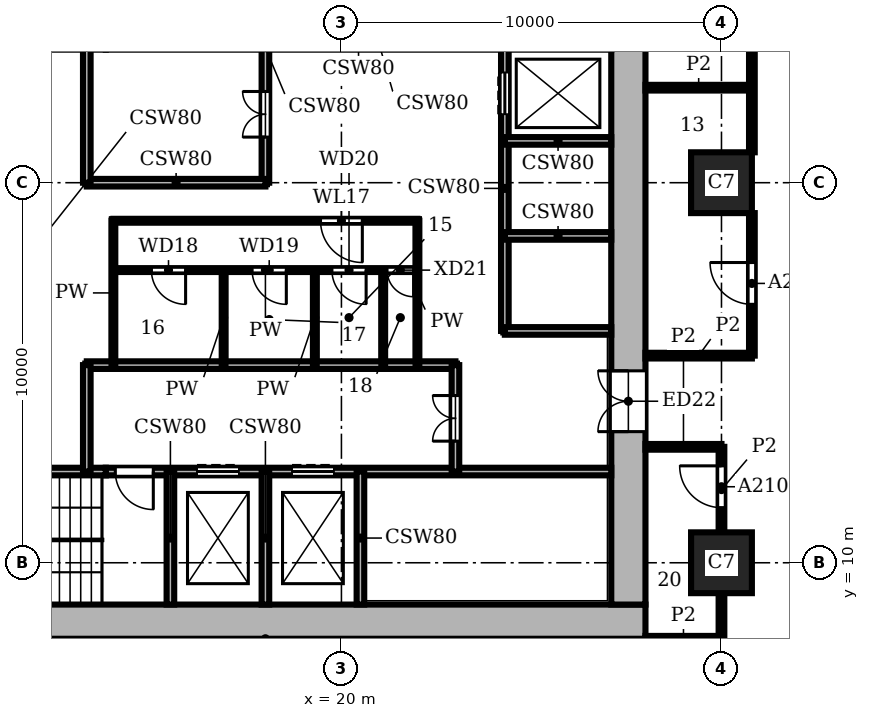
"""IFC4 building model, lengths in metres.
Left out: names, types, materials, properties, quantities, classifications, styles, units other than length and angle.
Written with IfcOpenShell. Run it as: python <this file> out.ifc"""

import sys

from ifc_helpers import new_model, si_unit, direction, frame, frame_2d, origin, origin_2d, place, context, subcontext, project, spatial, rectangle, extrude, element, fill, save


model = new_model("IFC4")
c1 = context("Model", 3, precision=1e-05, world=origin(), true_north=direction((0.0, 1.0)))
c2 = subcontext(c1, "Body", "Model", "MODEL_VIEW")
j1 = project(units=[si_unit("LENGTHUNIT", "METRE"), si_unit("PLANEANGLEUNIT", "RADIAN")], contexts=[c1])
p1 = place(None, origin())
s1 = spatial("IfcSite", under=j1, at=p1, CompositionType="ELEMENT")
p2 = place(p1, origin())
s2 = spatial("IfcBuilding", under=s1, at=p2, CompositionType="ELEMENT")
p3 = place(p2, frame((0.0, 0.0, 23.7)))
s3 = spatial("IfcBuildingStorey", under=s2, at=p3, CompositionType="ELEMENT", Elevation=23.7)
for number, where, z_axis, x_axis in (
    (1, (30.0, 10.0, 0.0), (0.0, 0.0, 1.0), (1.0, 0.0, 0.0)),
    (2, (30.0, 20.0, 0.0), (0.0, 0.0, 1.0), (1.0, 0.0, 0.0)),
):
    element("IfcColumn", number, at=place(p3, frame(where, z_axis=z_axis, x_axis=x_axis)), inside=s3, PredefinedType="COLUMN", context=c2, shape_type="SweptSolid", body=[
        extrude(rectangle(XDim=1.6, YDim=1.6, at=origin_2d()), origin(), (0.0, 0.0, 1.0), 3.9),
    ])
p4 = place(p3, frame((8.0, 8.45, 0.0), z_axis=(0.0, 0.0, 1.0), x_axis=(1.0, 0.0, 0.0)))
e3 = element("IfcWall", 3, at=p4, inside=s3, PredefinedType="SHEAR", context=c2, shape_type="SweptSolid", body=[
    extrude(rectangle(XDim=20.0, YDim=0.9, at=frame_2d((10.0, 0.0))), origin(), (0.0, 0.0, 1.0), 3.9),
])
p5 = place(p3, frame((27.55, 8.9, 0.0), z_axis=(0.0, 0.0, 1.0), x_axis=(0.0, 1.0, 0.0)))
e4 = element("IfcWall", 4, at=p5, inside=s3, PredefinedType="SHEAR", context=c2, shape_type="SweptSolid", body=[
    extrude(rectangle(XDim=18.2, YDim=0.9, at=frame_2d((9.1, 0.0))), origin(), (0.0, 0.0, 1.0), 3.9),
])
p6 = place(p5, frame((4.55, 0.0, 0.0)))
e5 = element("IfcOpeningElement", 5, at=p6, cuts=e4, PredefinedType="OPENING", context=c2, shape_type="SweptSolid", body=[
    extrude(rectangle(XDim=1.6, YDim=2.1, at=frame_2d((0.8, 1.05))), frame((0.0, 0.46, 0.0), z_axis=(0.0, -1.0, 0.0), x_axis=(1.0, 0.0, 0.0)), (0.0, 0.0, 1.0), 0.92),
])
p7 = place(p3, frame((8.9, 12.4, 0.0), z_axis=(0.0, 0.0, 1.0), x_axis=(1.0, 0.0, 0.0)))
e6 = element("IfcWall", 6, at=p7, inside=s3, PredefinedType="SHEAR", context=c2, shape_type="SweptSolid", body=[
    extrude(rectangle(XDim=4.9, YDim=0.2, at=frame_2d((2.45, 0.0))), origin(), (0.0, 0.0, 1.0), 3.58),
])
p8 = place(p3, frame((13.8, 12.4, 0.0), z_axis=(0.0, 0.0, 1.0), x_axis=(1.0, 0.0, 0.0)))
e7 = element("IfcWall", 7, at=p8, inside=s3, PredefinedType="SHEAR", context=c2, shape_type="SweptSolid", body=[
    extrude(rectangle(XDim=13.3, YDim=0.2, at=frame_2d((6.65, 0.0))), origin(), (0.0, 0.0, 1.0), 3.58),
])
p9 = place(p8, frame((2.4, 0.0, 0.0)))
e8 = element("IfcOpeningElement", 8, at=p9, cuts=e7, PredefinedType="OPENING", context=c2, shape_type="SweptSolid", body=[
    extrude(rectangle(XDim=1.1, YDim=2.1, at=frame_2d((0.55, 1.05))), frame((0.0, 0.11, 0.0), z_axis=(0.0, -1.0, 0.0), x_axis=(1.0, 0.0, 0.0)), (0.0, 0.0, 1.0), 0.22),
])
p10 = place(p8, frame((4.9, 0.0, 0.0)))
e9 = element("IfcOpeningElement", 9, at=p10, cuts=e7, PredefinedType="OPENING", context=c2, shape_type="SweptSolid", body=[
    extrude(rectangle(XDim=1.1, YDim=2.1, at=frame_2d((0.55, 1.05))), frame((0.0, 0.11, 0.0), z_axis=(0.0, -1.0, 0.0), x_axis=(1.0, 0.0, 0.0)), (0.0, 0.0, 1.0), 0.22),
])
p11 = place(p8, frame((0.25, 0.0, 0.0)))
e10 = element("IfcOpeningElement", 10, at=p11, cuts=e7, PredefinedType="OPENING", context=c2, shape_type="SweptSolid", body=[
    extrude(rectangle(XDim=1.0, YDim=2.1, at=frame_2d((0.5, 1.05))), frame((0.0, 0.11, 0.0), z_axis=(0.0, -1.0, 0.0), x_axis=(1.0, 0.0, 0.0)), (0.0, 0.0, 1.0), 0.22),
])
p12 = place(p3, frame((13.3, 15.2, 0.0), z_axis=(0.0, 0.0, 1.0), x_axis=(1.0, 0.0, 0.0)))
e11 = element("IfcWall", 11, at=p12, inside=s3, PredefinedType="SHEAR", context=c2, shape_type="SweptSolid", body=[
    extrude(rectangle(XDim=9.7, YDim=0.2, at=frame_2d((4.85, 0.0))), origin(), (0.0, 0.0, 1.0), 3.58),
])
p13 = place(p3, frame((24.3, 16.1, 0.0), z_axis=(0.0, 0.0, 1.0), x_axis=(1.0, 0.0, 0.0)))
e12 = element("IfcWall", 12, at=p13, inside=s3, PredefinedType="SHEAR", context=c2, shape_type="SweptSolid", body=[
    extrude(rectangle(XDim=2.8, YDim=0.2, at=frame_2d((1.4, 0.0))), origin(), (0.0, 0.0, 1.0), 3.58),
])
p14 = place(p3, frame((14.0, 17.7, 0.0), z_axis=(0.0, 0.0, 1.0), x_axis=(1.0, 0.0, 0.0)))
e13 = element("IfcWall", 13, at=p14, inside=s3, PredefinedType="PARTITIONING", context=c2, shape_type="SweptSolid", body=[
    extrude(rectangle(XDim=8.0, YDim=0.1, at=frame_2d((4.0, 0.0))), origin(), (0.0, 0.0, 1.0), 3.58),
])
p15 = place(p14, frame((1.0, 0.0, 0.0)))
e14 = element("IfcOpeningElement", 14, at=p15, cuts=e13, PredefinedType="OPENING", context=c2, shape_type="SweptSolid", body=[
    extrude(rectangle(XDim=0.9, YDim=2.1, at=frame_2d((0.45, 1.05))), frame((0.0, 0.06, 0.0), z_axis=(0.0, -1.0, 0.0), x_axis=(1.0, 0.0, 0.0)), (0.0, 0.0, 1.0), 0.12),
])
p16 = place(p14, frame((3.65, 0.0, 0.0)))
e15 = element("IfcOpeningElement", 15, at=p16, cuts=e13, PredefinedType="OPENING", context=c2, shape_type="SweptSolid", body=[
    extrude(rectangle(XDim=0.9, YDim=2.1, at=frame_2d((0.45, 1.05))), frame((0.0, 0.06, 0.0), z_axis=(0.0, -1.0, 0.0), x_axis=(1.0, 0.0, 0.0)), (0.0, 0.0, 1.0), 0.12),
])
p17 = place(p14, frame((5.75, 0.0, 0.0)))
e16 = element("IfcOpeningElement", 16, at=p17, cuts=e13, PredefinedType="OPENING", context=c2, shape_type="SweptSolid", body=[
    extrude(rectangle(XDim=0.9, YDim=2.1, at=frame_2d((0.45, 1.05))), frame((0.0, 0.06, 0.0), z_axis=(0.0, -1.0, 0.0), x_axis=(1.0, 0.0, 0.0)), (0.0, 0.0, 1.0), 0.12),
])
p18 = place(p14, frame((7.2, 0.0, 0.0)))
e17 = element("IfcOpeningElement", 17, at=p18, cuts=e13, PredefinedType="OPENING", context=c2, shape_type="SweptSolid", body=[
    extrude(rectangle(XDim=0.7, YDim=2.1, at=frame_2d((0.35, 1.05))), frame((0.0, 0.06, 0.0), z_axis=(0.0, -1.0, 0.0), x_axis=(1.0, 0.0, 0.0)), (0.0, 0.0, 1.0), 0.12),
])
p19 = place(p3, frame((24.3, 18.6, 0.0), z_axis=(0.0, 0.0, 1.0), x_axis=(1.0, 0.0, 0.0)))
e18 = element("IfcWall", 18, at=p19, inside=s3, PredefinedType="SHEAR", context=c2, shape_type="SweptSolid", body=[
    extrude(rectangle(XDim=2.8, YDim=0.2, at=frame_2d((1.4, 0.0))), origin(), (0.0, 0.0, 1.0), 3.58),
])
p20 = place(p3, frame((14.0, 19.0, 0.0), z_axis=(0.0, 0.0, 1.0), x_axis=(1.0, 0.0, 0.0)))
e19 = element("IfcWall", 19, at=p20, inside=s3, PredefinedType="PARTITIONING", context=c2, shape_type="SweptSolid", body=[
    extrude(rectangle(XDim=8.0, YDim=0.1, at=frame_2d((4.0, 0.0))), origin(), (0.0, 0.0, 1.0), 3.58),
])
p21 = place(p20, frame((5.45, 0.0, 0.0)))
e20 = element("IfcOpeningElement", 20, at=p21, cuts=e19, PredefinedType="OPENING", context=c2, shape_type="SweptSolid", body=[
    extrude(rectangle(XDim=1.1, YDim=2.1, at=frame_2d((0.55, 1.05))), frame((0.0, 0.06, 0.0), z_axis=(0.0, -1.0, 0.0), x_axis=(1.0, 0.0, 0.0)), (0.0, 0.0, 1.0), 0.12),
])
p22 = place(p3, frame((13.3, 20.0, 0.0), z_axis=(0.0, 0.0, 1.0), x_axis=(1.0, 0.0, 0.0)))
e21 = element("IfcWall", 21, at=p22, inside=s3, PredefinedType="SHEAR", context=c2, shape_type="SweptSolid", body=[
    extrude(rectangle(XDim=4.7, YDim=0.2, at=frame_2d((2.35, 0.0))), origin(), (0.0, 0.0, 1.0), 3.58),
])
for number, where, z_axis, x_axis in (
    (22, (24.3, 21.1, 0.0), (0.0, 0.0, 1.0), (1.0, 0.0, 0.0)),
    (23, (13.3, 12.4, 0.0), (0.0, 0.0, 1.0), (0.0, 1.0, 0.0)),
):
    element("IfcWall", number, at=place(p3, frame(where, z_axis=z_axis, x_axis=x_axis)), inside=s3, PredefinedType="SHEAR", context=c2, shape_type="SweptSolid", body=[
        extrude(rectangle(XDim=2.8, YDim=0.2, at=frame_2d((1.4, 0.0))), origin(), (0.0, 0.0, 1.0), 3.58),
    ])
p23 = place(p3, frame((13.3, 20.0, 0.0), z_axis=(0.0, 0.0, 1.0), x_axis=(0.0, 1.0, 0.0)))
e24 = element("IfcWall", 24, at=p23, inside=s3, PredefinedType="SHEAR", context=c2, shape_type="SweptSolid", body=[
    extrude(rectangle(XDim=3.6, YDim=0.2, at=frame_2d((1.8, 0.0))), origin(), (0.0, 0.0, 1.0), 3.58),
])
p24 = place(p3, frame((14.0, 15.2, 0.0), z_axis=(0.0, 0.0, 1.0), x_axis=(0.0, 1.0, 0.0)))
e25 = element("IfcWall", 25, at=p24, inside=s3, PredefinedType="PARTITIONING", context=c2, shape_type="SweptSolid", body=[
    extrude(rectangle(XDim=3.8, YDim=0.1, at=frame_2d((1.9, 0.0))), origin(), (0.0, 0.0, 1.0), 3.58),
])
p25 = place(p3, frame((15.5, 8.9, 0.0), z_axis=(0.0, 0.0, 1.0), x_axis=(0.0, 1.0, 0.0)))
e26 = element("IfcWall", 26, at=p25, inside=s3, PredefinedType="SHEAR", context=c2, shape_type="SweptSolid", body=[
    extrude(rectangle(XDim=3.5, YDim=0.2, at=frame_2d((1.75, 0.0))), origin(), (0.0, 0.0, 1.0), 3.58),
])
p26 = place(p3, frame((16.9, 15.2, 0.0), z_axis=(0.0, 0.0, 1.0), x_axis=(0.0, 1.0, 0.0)))
e27 = element("IfcWall", 27, at=p26, inside=s3, PredefinedType="PARTITIONING", context=c2, shape_type="SweptSolid", body=[
    extrude(rectangle(XDim=2.5, YDim=0.1, at=frame_2d((1.25, 0.0))), origin(), (0.0, 0.0, 1.0), 3.58),
])
p27 = place(p3, frame((18.0, 8.9, 0.0), z_axis=(0.0, 0.0, 1.0), x_axis=(0.0, 1.0, 0.0)))
e28 = element("IfcWall", 28, at=p27, inside=s3, PredefinedType="SHEAR", context=c2, shape_type="SweptSolid", body=[
    extrude(rectangle(XDim=3.5, YDim=0.2, at=frame_2d((1.75, 0.0))), origin(), (0.0, 0.0, 1.0), 3.58),
])
p28 = place(p3, frame((18.0, 20.0, 0.0), z_axis=(0.0, 0.0, 1.0), x_axis=(0.0, 1.0, 0.0)))
e29 = element("IfcWall", 29, at=p28, inside=s3, PredefinedType="SHEAR", context=c2, shape_type="SweptSolid", body=[
    extrude(rectangle(XDim=7.1, YDim=0.2, at=frame_2d((3.55, 0.0))), origin(), (0.0, 0.0, 1.0), 3.58),
])
p29 = place(p28, frame((1.2, 0.0, 0.0)))
e30 = element("IfcOpeningElement", 30, at=p29, cuts=e29, PredefinedType="OPENING", context=c2, shape_type="SweptSolid", body=[
    extrude(rectangle(XDim=1.2, YDim=2.1, at=frame_2d((0.6, 1.05))), frame((0.0, 0.11, 0.0), z_axis=(0.0, -1.0, 0.0), x_axis=(1.0, 0.0, 0.0)), (0.0, 0.0, 1.0), 0.22),
])
p30 = place(p3, frame((19.3, 15.2, 0.0), z_axis=(0.0, 0.0, 1.0), x_axis=(0.0, 1.0, 0.0)))
e31 = element("IfcWall", 31, at=p30, inside=s3, PredefinedType="PARTITIONING", context=c2, shape_type="SweptSolid", body=[
    extrude(rectangle(XDim=2.5, YDim=0.1, at=frame_2d((1.25, 0.0))), origin(), (0.0, 0.0, 1.0), 3.58),
])
p31 = place(p3, frame((20.5, 8.9, 0.0), z_axis=(0.0, 0.0, 1.0), x_axis=(0.0, 1.0, 0.0)))
e32 = element("IfcWall", 32, at=p31, inside=s3, PredefinedType="SHEAR", context=c2, shape_type="SweptSolid", body=[
    extrude(rectangle(XDim=3.5, YDim=0.2, at=frame_2d((1.75, 0.0))), origin(), (0.0, 0.0, 1.0), 3.58),
])
p32 = place(p3, frame((21.1, 15.2, 0.0), z_axis=(0.0, 0.0, 1.0), x_axis=(0.0, 1.0, 0.0)))
e33 = element("IfcWall", 33, at=p32, inside=s3, PredefinedType="PARTITIONING", context=c2, shape_type="SweptSolid", body=[
    extrude(rectangle(XDim=2.5, YDim=0.1, at=frame_2d((1.25, 0.0))), origin(), (0.0, 0.0, 1.0), 3.58),
])
p33 = place(p3, frame((22.0, 15.2, 0.0), z_axis=(0.0, 0.0, 1.0), x_axis=(0.0, 1.0, 0.0)))
e34 = element("IfcWall", 34, at=p33, inside=s3, PredefinedType="PARTITIONING", context=c2, shape_type="SweptSolid", body=[
    extrude(rectangle(XDim=3.8, YDim=0.1, at=frame_2d((1.9, 0.0))), origin(), (0.0, 0.0, 1.0), 3.58),
])
p34 = place(p3, frame((23.0, 12.4, 0.0), z_axis=(0.0, 0.0, 1.0), x_axis=(0.0, 1.0, 0.0)))
e35 = element("IfcWall", 35, at=p34, inside=s3, PredefinedType="SHEAR", context=c2, shape_type="SweptSolid", body=[
    extrude(rectangle(XDim=2.8, YDim=0.2, at=frame_2d((1.4, 0.0))), origin(), (0.0, 0.0, 1.0), 3.58),
])
p35 = place(p34, frame((0.8, 0.0, 0.0)))
e36 = element("IfcOpeningElement", 36, at=p35, cuts=e35, PredefinedType="OPENING", context=c2, shape_type="SweptSolid", body=[
    extrude(rectangle(XDim=1.2, YDim=2.1, at=frame_2d((0.6, 1.05))), frame((0.0, 0.11, 0.0), z_axis=(0.0, -1.0, 0.0), x_axis=(1.0, 0.0, 0.0)), (0.0, 0.0, 1.0), 0.22),
])
p36 = place(p3, frame((24.3, 16.1, 0.0), z_axis=(0.0, 0.0, 1.0), x_axis=(0.0, 1.0, 0.0)))
e37 = element("IfcWall", 37, at=p36, inside=s3, PredefinedType="SHEAR", context=c2, shape_type="SweptSolid", body=[
    extrude(rectangle(XDim=7.5, YDim=0.2, at=frame_2d((3.75, 0.0))), origin(), (0.0, 0.0, 1.0), 3.58),
])
p37 = place(p36, frame((5.7, 0.0, 0.0)))
e38 = element("IfcOpeningElement", 38, at=p37, cuts=e37, PredefinedType="OPENING", context=c2, shape_type="SweptSolid", body=[
    extrude(rectangle(XDim=1.1, YDim=2.1, at=frame_2d((0.55, 1.05))), frame((0.0, 0.11, 0.0), z_axis=(0.0, -1.0, 0.0), x_axis=(1.0, 0.0, 0.0)), (0.0, 0.0, 1.0), 0.22),
])
p38 = place(p3, frame((30.0, 8.0, 0.0), z_axis=(0.0, 0.0, 1.0), x_axis=(0.0, 1.0, 0.0)))
e39 = element("IfcWall", 39, at=p38, inside=s3, PredefinedType="PARTITIONING", context=c2, shape_type="SweptSolid", body=[
    extrude(rectangle(XDim=1.2, YDim=0.15, at=frame_2d((0.6, 0.0))), origin(), (0.0, 0.0, 1.0), 3.58),
])
p39 = place(p3, frame((30.0, 10.8, 0.0), z_axis=(0.0, 0.0, 1.0), x_axis=(0.0, 1.0, 0.0)))
e40 = element("IfcWall", 40, at=p39, inside=s3, PredefinedType="PARTITIONING", context=c2, shape_type="SweptSolid", body=[
    extrude(rectangle(XDim=2.25, YDim=0.15, at=frame_2d((1.125, 0.0))), origin(), (0.0, 0.0, 1.0), 3.58),
])
p40 = place(p39, frame((0.65, 0.0, 0.0)))
e41 = element("IfcOpeningElement", 41, at=p40, cuts=e40, PredefinedType="OPENING", context=c2, shape_type="SweptSolid", body=[
    extrude(rectangle(XDim=1.1, YDim=2.1, at=frame_2d((0.55, 1.05))), frame((0.0, 0.085, 0.0), z_axis=(0.0, -1.0, 0.0), x_axis=(1.0, 0.0, 0.0)), (0.0, 0.0, 1.0), 0.17),
])
p41 = place(p3, frame((30.8, 15.45, 0.0), z_axis=(0.0, 0.0, 1.0), x_axis=(0.0, 1.0, 0.0)))
e42 = element("IfcWall", 42, at=p41, inside=s3, PredefinedType="PARTITIONING", context=c2, shape_type="SweptSolid", body=[
    extrude(rectangle(XDim=3.75, YDim=0.15, at=frame_2d((1.875, 0.0))), origin(), (0.0, 0.0, 1.0), 3.58),
])
p42 = place(p41, frame((1.35, 0.0, 0.0)))
e43 = element("IfcOpeningElement", 43, at=p42, cuts=e42, PredefinedType="OPENING", context=c2, shape_type="SweptSolid", body=[
    extrude(rectangle(XDim=1.1, YDim=2.1, at=frame_2d((0.55, 1.05))), frame((0.0, 0.085, 0.0), z_axis=(0.0, -1.0, 0.0), x_axis=(1.0, 0.0, 0.0)), (0.0, 0.0, 1.0), 0.17),
])
p43 = place(p3, frame((30.8, 20.8, 0.0), z_axis=(0.0, 0.0, 1.0), x_axis=(0.0, 1.0, 0.0)))
e44 = element("IfcWall", 44, at=p43, inside=s3, PredefinedType="PARTITIONING", context=c2, shape_type="SweptSolid", body=[
    extrude(rectangle(XDim=8.4, YDim=0.15, at=frame_2d((4.2, 0.0))), origin(), (0.0, 0.0, 1.0), 3.58),
])
p44 = place(p43, frame((3.8, 0.0, 0.0)))
e45 = element("IfcOpeningElement", 45, at=p44, cuts=e44, PredefinedType="OPENING", context=c2, shape_type="SweptSolid", body=[
    extrude(rectangle(XDim=1.1, YDim=2.1, at=frame_2d((0.55, 1.05))), frame((0.0, 0.085, 0.0), z_axis=(0.0, -1.0, 0.0), x_axis=(1.0, 0.0, 0.0)), (0.0, 0.0, 1.0), 0.17),
])
for number, where, z_axis, x_axis in (
    (46, (28.0, 8.0, 0.0), (0.0, 0.0, 1.0), (1.0, 0.0, 0.0)),
    (47, (28.0, 13.05, 0.0), (0.0, 0.0, 1.0), (1.0, 0.0, 0.0)),
):
    element("IfcWall", number, at=place(p3, frame(where, z_axis=z_axis, x_axis=x_axis)), inside=s3, PredefinedType="PARTITIONING", context=c2, shape_type="SweptSolid", body=[
        extrude(rectangle(XDim=2.0, YDim=0.15, at=frame_2d((1.0, 0.0))), origin(), (0.0, 0.0, 1.0), 3.58),
    ])
for number, where, z_axis, x_axis in (
    (48, (28.0, 15.45, 0.0), (0.0, 0.0, 1.0), (1.0, 0.0, 0.0)),
    (49, (28.0, 22.5, 0.0), (0.0, 0.0, 1.0), (1.0, 0.0, 0.0)),
):
    element("IfcWall", number, at=place(p3, frame(where, z_axis=z_axis, x_axis=x_axis)), inside=s3, PredefinedType="PARTITIONING", context=c2, shape_type="SweptSolid", body=[
        extrude(rectangle(XDim=2.8, YDim=0.15, at=frame_2d((1.4, 0.0))), origin(), (0.0, 0.0, 1.0), 3.58),
    ])
p45 = place(p37, origin())
e50 = element("IfcDoor", 50, at=p45, inside=s3, OperationType="DOUBLE_DOOR_SLIDING", PredefinedType="DOOR", context=c2, shape_type="SweptSolid", body=[
    extrude(rectangle(XDim=1.1, YDim=2.1, at=frame_2d((0.55, 1.05))), frame((0.0, 0.025, 0.0), z_axis=(0.0, -1.0, 0.0), x_axis=(1.0, 0.0, 0.0)), (0.0, 0.0, 1.0), 0.05),
])
fill(e38, e50)
p46 = place(p9, origin())
e51 = element("IfcDoor", 51, at=p46, inside=s3, OperationType="DOUBLE_DOOR_SLIDING", PredefinedType="DOOR", context=c2, shape_type="SweptSolid", body=[
    extrude(rectangle(XDim=1.1, YDim=2.1, at=frame_2d((0.55, 1.05))), frame((0.0, 0.025, 0.0), z_axis=(0.0, -1.0, 0.0), x_axis=(1.0, 0.0, 0.0)), (0.0, 0.0, 1.0), 0.05),
])
fill(e8, e51)
p47 = place(p10, origin())
e52 = element("IfcDoor", 52, at=p47, inside=s3, OperationType="DOUBLE_DOOR_SLIDING", PredefinedType="DOOR", context=c2, shape_type="SweptSolid", body=[
    extrude(rectangle(XDim=1.1, YDim=2.1, at=frame_2d((0.55, 1.05))), frame((0.0, 0.025, 0.0), z_axis=(0.0, -1.0, 0.0), x_axis=(1.0, 0.0, 0.0)), (0.0, 0.0, 1.0), 0.05),
])
fill(e9, e52)
p48 = place(p11, frame((1.0, 0.0, 0.0), z_axis=(0.0, 0.0, 1.0), x_axis=(-1.0, 0.0, 0.0)))
e53 = element("IfcDoor", 53, at=p48, inside=s3, OperationType="SINGLE_SWING_LEFT", PredefinedType="DOOR", context=c2, shape_type="SweptSolid", body=[
    extrude(rectangle(XDim=1.0, YDim=2.1, at=frame_2d((0.5, 1.05))), frame((0.0, 0.025, 0.0), z_axis=(0.0, -1.0, 0.0), x_axis=(1.0, 0.0, 0.0)), (0.0, 0.0, 1.0), 0.05),
])
fill(e10, e53)
p49 = place(p35, origin())
e54 = element("IfcDoor", 54, at=p49, inside=s3, OperationType="DOUBLE_DOOR_SINGLE_SWING", PredefinedType="DOOR", context=c2, shape_type="SweptSolid", body=[
    extrude(rectangle(XDim=1.2, YDim=2.1, at=frame_2d((0.6, 1.05))), frame((0.0, 0.025, 0.0), z_axis=(0.0, -1.0, 0.0), x_axis=(1.0, 0.0, 0.0)), (0.0, 0.0, 1.0), 0.05),
])
fill(e36, e54)
p50 = place(p29, origin())
e55 = element("IfcDoor", 55, at=p50, inside=s3, OperationType="DOUBLE_DOOR_SINGLE_SWING", PredefinedType="DOOR", context=c2, shape_type="SweptSolid", body=[
    extrude(rectangle(XDim=1.2, YDim=2.1, at=frame_2d((0.6, 1.05))), frame((0.0, 0.025, 0.0), z_axis=(0.0, -1.0, 0.0), x_axis=(1.0, 0.0, 0.0)), (0.0, 0.0, 1.0), 0.05),
])
fill(e30, e55)
p51 = place(p21, frame((1.1, 0.0, 0.0), z_axis=(0.0, 0.0, 1.0), x_axis=(-1.0, 0.0, 0.0)))
e56 = element("IfcDoor", 56, at=p51, inside=s3, OperationType="SINGLE_SWING_LEFT", PredefinedType="DOOR", context=c2, shape_type="SweptSolid", body=[
    extrude(rectangle(XDim=1.1, YDim=2.1, at=frame_2d((0.55, 1.05))), frame((0.0, 0.025, 0.0), z_axis=(0.0, -1.0, 0.0), x_axis=(1.0, 0.0, 0.0)), (0.0, 0.0, 1.0), 0.05),
])
fill(e20, e56)
p52 = place(p15, frame((0.9, 0.0, 0.0), z_axis=(0.0, 0.0, 1.0), x_axis=(-1.0, 0.0, 0.0)))
e57 = element("IfcDoor", 57, at=p52, inside=s3, OperationType="SINGLE_SWING_LEFT", PredefinedType="DOOR", context=c2, shape_type="SweptSolid", body=[
    extrude(rectangle(XDim=0.9, YDim=2.1, at=frame_2d((0.45, 1.05))), frame((0.0, 0.025, 0.0), z_axis=(0.0, -1.0, 0.0), x_axis=(1.0, 0.0, 0.0)), (0.0, 0.0, 1.0), 0.05),
])
fill(e14, e57)
p53 = place(p16, frame((0.9, 0.0, 0.0), z_axis=(0.0, 0.0, 1.0), x_axis=(-1.0, 0.0, 0.0)))
e58 = element("IfcDoor", 58, at=p53, inside=s3, OperationType="SINGLE_SWING_LEFT", PredefinedType="DOOR", context=c2, shape_type="SweptSolid", body=[
    extrude(rectangle(XDim=0.9, YDim=2.1, at=frame_2d((0.45, 1.05))), frame((0.0, 0.025, 0.0), z_axis=(0.0, -1.0, 0.0), x_axis=(1.0, 0.0, 0.0)), (0.0, 0.0, 1.0), 0.05),
])
fill(e15, e58)
p54 = place(p17, frame((0.9, 0.0, 0.0), z_axis=(0.0, 0.0, 1.0), x_axis=(-1.0, 0.0, 0.0)))
e59 = element("IfcDoor", 59, at=p54, inside=s3, OperationType="SINGLE_SWING_LEFT", PredefinedType="DOOR", context=c2, shape_type="SweptSolid", body=[
    extrude(rectangle(XDim=0.9, YDim=2.1, at=frame_2d((0.45, 1.05))), frame((0.0, 0.025, 0.0), z_axis=(0.0, -1.0, 0.0), x_axis=(1.0, 0.0, 0.0)), (0.0, 0.0, 1.0), 0.05),
])
fill(e16, e59)
p55 = place(p18, frame((0.7, 0.0, 0.0), z_axis=(0.0, 0.0, 1.0), x_axis=(-1.0, 0.0, 0.0)))
e60 = element("IfcDoor", 60, at=p55, inside=s3, OperationType="SINGLE_SWING_LEFT", PredefinedType="DOOR", context=c2, shape_type="SweptSolid", body=[
    extrude(rectangle(XDim=0.7, YDim=2.1, at=frame_2d((0.35, 1.05))), frame((0.0, 0.025, 0.0), z_axis=(0.0, -1.0, 0.0), x_axis=(1.0, 0.0, 0.0)), (0.0, 0.0, 1.0), 0.05),
])
fill(e17, e60)
p56 = place(p6, origin())
e61 = element("IfcDoor", 61, at=p56, inside=s3, OperationType="DOUBLE_DOOR_SINGLE_SWING", PredefinedType="DOOR", context=c2, shape_type="SweptSolid", body=[
    extrude(rectangle(XDim=1.6, YDim=2.1, at=frame_2d((0.8, 1.05))), frame((0.0, 0.025, 0.0), z_axis=(0.0, -1.0, 0.0), x_axis=(1.0, 0.0, 0.0)), (0.0, 0.0, 1.0), 0.05),
])
fill(e5, e61)
p57 = place(p40, origin())
e62 = element("IfcDoor", 62, at=p57, inside=s3, OperationType="SINGLE_SWING_RIGHT", PredefinedType="DOOR", context=c2, shape_type="SweptSolid", body=[
    extrude(rectangle(XDim=1.1, YDim=2.1, at=frame_2d((0.55, 1.05))), frame((0.0, 0.025, 0.0), z_axis=(0.0, -1.0, 0.0), x_axis=(1.0, 0.0, 0.0)), (0.0, 0.0, 1.0), 0.05),
])
fill(e41, e62)
p58 = place(p42, origin())
e63 = element("IfcDoor", 63, at=p58, inside=s3, OperationType="SINGLE_SWING_RIGHT", PredefinedType="DOOR", context=c2, shape_type="SweptSolid", body=[
    extrude(rectangle(XDim=1.1, YDim=2.1, at=frame_2d((0.55, 1.05))), frame((0.0, 0.025, 0.0), z_axis=(0.0, -1.0, 0.0), x_axis=(1.0, 0.0, 0.0)), (0.0, 0.0, 1.0), 0.05),
])
fill(e43, e63)
save(model, sys.argv[1])
